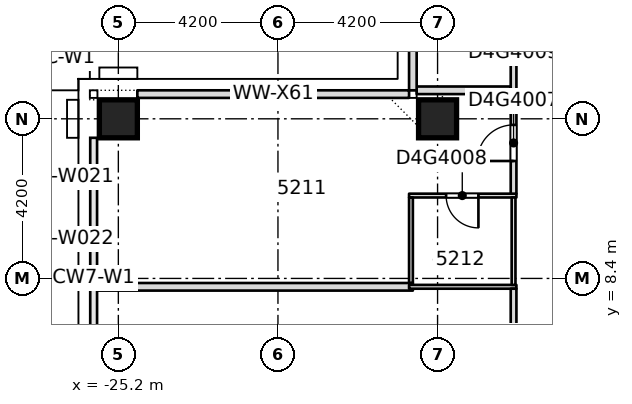
"""IFC4 building model, lengths in metres.
Left out: names, types, materials, properties, quantities, classifications, styles, units other than length and angle.
Written with IfcOpenShell. Run it as: python <this file> out.ifc"""

import sys

from ifc_helpers import new_model, si_unit, direction, frame, frame_2d, origin, origin_2d, place, context, subcontext, project, spatial, rectangle, extrude, element, fill, save


model = new_model("IFC4")
c1 = context("Model", 3, precision=1e-05, world=origin(), true_north=direction((0.0, 1.0)))
c2 = subcontext(c1, "Body", "Model", "MODEL_VIEW")
j1 = project(units=[si_unit("LENGTHUNIT", "METRE"), si_unit("PLANEANGLEUNIT", "RADIAN")], contexts=[c1])
p1 = place(None, origin())
s1 = spatial("IfcSite", under=j1, at=p1, CompositionType="ELEMENT")
p2 = place(p1, origin())
s2 = spatial("IfcBuilding", under=s1, at=p2, CompositionType="ELEMENT")
p3 = place(p2, frame((0.0, 0.0, 199.7)))
s3 = spatial("IfcBuildingStorey", under=s2, at=p3, CompositionType="ELEMENT", Elevation=199.7)
for number, where, z_axis, x_axis in (
    (1, (-25.2, 12.6, -0.4), (0.0, 0.0, 1.0), (1.0, 0.0, 0.0)),
    (2, (-16.8, 12.6, -0.4), (0.0, 0.0, 1.0), (1.0, 0.0, 0.0)),
):
    element("IfcColumn", number, at=place(p3, frame(where, z_axis=z_axis, x_axis=x_axis)), inside=s3, PredefinedType="COLUMN", context=c2, shape_type="SweptSolid", body=[
        extrude(rectangle(XDim=1.0, YDim=1.0, at=origin_2d()), origin(), (0.0, 0.0, 1.0), 3.45),
    ])
p4 = place(p3, frame((-25.75, 8.18, 0.0), z_axis=(0.0, 0.0, 1.0), x_axis=(1.0, 0.0, 0.0)))
e3 = element("IfcWall", 3, at=p4, inside=s3, PredefinedType="PARTITIONING", context=c2, shape_type="SweptSolid", body=[
    extrude(rectangle(XDim=8.3, YDim=0.2, at=frame_2d((4.15, 0.0))), origin(), (0.0, 0.0, 1.0), 3.05),
])
p5 = place(p3, frame((-17.55, 8.18, 0.0), z_axis=(0.0, 0.0, 1.0), x_axis=(1.0, 0.0, 0.0)))
e4 = element("IfcWall", 4, at=p5, inside=s3, PredefinedType="PARTITIONING", context=c2, shape_type="SweptSolid", body=[
    extrude(rectangle(XDim=2.825, YDim=0.1, at=frame_2d((1.413, 0.0))), origin(), (0.0, 0.0, 1.0), 3.05),
])
p6 = place(p3, frame((-17.55, 10.58, 0.0), z_axis=(0.0, 0.0, 1.0), x_axis=(1.0, 0.0, 0.0)))
e5 = element("IfcWall", 5, at=p6, inside=s3, PredefinedType="PARTITIONING", context=c2, shape_type="SweptSolid", body=[
    extrude(rectangle(XDim=2.825, YDim=0.1, at=frame_2d((1.413, 0.0))), origin(), (0.0, 0.0, 1.0), 3.05),
])
p7 = place(p6, frame((0.975, 0.0, 0.0)))
e6 = element("IfcOpeningElement", 6, at=p7, cuts=e5, PredefinedType="OPENING", context=c2, shape_type="SweptSolid", body=[
    extrude(rectangle(XDim=0.85, YDim=2.1, at=frame_2d((0.425, 1.05))), frame((0.0, 0.06, 0.0), z_axis=(0.0, -1.0, 0.0), x_axis=(1.0, 0.0, 0.0)), (0.0, 0.0, 1.0), 0.12),
])
p8 = place(p3, frame((-17.35, 13.35, 0.0), z_axis=(0.0, 0.0, 1.0), x_axis=(1.0, 0.0, 0.0)))
e7 = element("IfcWall", 7, at=p8, inside=s3, PredefinedType="PARTITIONING", context=c2, shape_type="SweptSolid", body=[
    extrude(rectangle(XDim=2.475, YDim=0.2, at=frame_2d((1.238, 0.0))), origin(), (0.0, 0.0, 1.0), 3.05),
])
p9 = place(p3, frame((-17.5, 8.28, 0.0), z_axis=(0.0, 0.0, 1.0), x_axis=(0.0, 1.0, 0.0)))
e8 = element("IfcWall", 8, at=p9, inside=s3, PredefinedType="PARTITIONING", context=c2, shape_type="SweptSolid", body=[
    extrude(rectangle(XDim=2.25, YDim=0.1, at=frame_2d((1.125, 0.0))), origin(), (0.0, 0.0, 1.0), 3.05),
])
p10 = place(p3, frame((-14.8, -10.45, 0.0), z_axis=(0.0, 0.0, 1.0), x_axis=(0.0, 1.0, 0.0)))
e9 = element("IfcWall", 9, at=p10, inside=s3, PredefinedType="PARTITIONING", context=c2, shape_type="SweptSolid", body=[
    extrude(rectangle(XDim=18.58, YDim=0.15, at=frame_2d((9.29, 0.0))), origin(), (0.0, 0.0, 1.0), 3.05),
])
p11 = place(p10, frame((0.9, 0.0, 0.0)))
e10 = element("IfcOpeningElement", 10, at=p11, cuts=e9, PredefinedType="OPENING", context=c2, shape_type="SweptSolid", body=[
    extrude(rectangle(XDim=0.95, YDim=2.1, at=frame_2d((0.475, 1.05))), frame((0.0, 0.085, 0.0), z_axis=(0.0, -1.0, 0.0), x_axis=(1.0, 0.0, 0.0)), (0.0, 0.0, 1.0), 0.17),
])
p12 = place(p10, frame((15.74, 0.0, 0.0)))
e11 = element("IfcOpeningElement", 11, at=p12, cuts=e9, PredefinedType="OPENING", context=c2, shape_type="SweptSolid", body=[
    extrude(rectangle(XDim=1.0, YDim=2.1, at=frame_2d((0.5, 1.05))), frame((0.0, 0.085, 0.0), z_axis=(0.0, -1.0, 0.0), x_axis=(1.0, 0.0, 0.0)), (0.0, 0.0, 1.0), 0.17),
])
p13 = place(p10, frame((9.9, 0.0, 0.0)))
e12 = element("IfcOpeningElement", 12, at=p13, cuts=e9, PredefinedType="OPENING", context=c2, shape_type="SweptSolid", body=[
    extrude(rectangle(XDim=1.1, YDim=2.1, at=frame_2d((0.55, 1.05))), frame((0.0, 0.085, 0.0), z_axis=(0.0, -1.0, 0.0), x_axis=(1.0, 0.0, 0.0)), (0.0, 0.0, 1.0), 0.17),
])
p14 = place(p10, frame((4.75, 0.0, 0.0)))
e13 = element("IfcOpeningElement", 13, at=p14, cuts=e9, PredefinedType="OPENING", context=c2, shape_type="SweptSolid", body=[
    extrude(rectangle(XDim=1.0, YDim=2.1, at=frame_2d((0.5, 1.05))), frame((0.0, 0.085, 0.0), z_axis=(0.0, -1.0, 0.0), x_axis=(1.0, 0.0, 0.0)), (0.0, 0.0, 1.0), 0.17),
])
p15 = place(p3, frame((-14.8, 8.23, 0.0), z_axis=(0.0, 0.0, 1.0), x_axis=(0.0, 1.0, 0.0)))
e14 = element("IfcWall", 14, at=p15, inside=s3, PredefinedType="PARTITIONING", context=c2, shape_type="SweptSolid", body=[
    extrude(rectangle(XDim=2.3, YDim=0.1, at=frame_2d((1.15, 0.0))), origin(), (0.0, 0.0, 1.0), 3.05),
])
p16 = place(p3, frame((-14.8, 10.63, 0.0), z_axis=(0.0, 0.0, 1.0), x_axis=(0.0, 1.0, 0.0)))
e15 = element("IfcWall", 15, at=p16, inside=s3, PredefinedType="PARTITIONING", context=c2, shape_type="SweptSolid", body=[
    extrude(rectangle(XDim=10.92, YDim=0.15, at=frame_2d((5.46, 0.0))), origin(), (0.0, 0.0, 1.0), 3.05),
])
p17 = place(p16, frame((0.86, 0.0, 0.0)))
e16 = element("IfcOpeningElement", 16, at=p17, cuts=e15, PredefinedType="OPENING", context=c2, shape_type="SweptSolid", body=[
    extrude(rectangle(XDim=0.95, YDim=2.1, at=frame_2d((0.475, 1.05))), frame((0.0, 0.085, 0.0), z_axis=(0.0, -1.0, 0.0), x_axis=(1.0, 0.0, 0.0)), (0.0, 0.0, 1.0), 0.17),
])
p18 = place(p16, frame((4.32, 0.0, 0.0)))
e17 = element("IfcOpeningElement", 17, at=p18, cuts=e15, PredefinedType="OPENING", context=c2, shape_type="SweptSolid", body=[
    extrude(rectangle(XDim=0.95, YDim=2.1, at=frame_2d((0.475, 1.05))), frame((0.0, 0.085, 0.0), z_axis=(0.0, -1.0, 0.0), x_axis=(1.0, 0.0, 0.0)), (0.0, 0.0, 1.0), 0.17),
])
p19 = place(p16, frame((8.22, 0.0, 0.0)))
e18 = element("IfcOpeningElement", 18, at=p19, cuts=e15, PredefinedType="OPENING", context=c2, shape_type="SweptSolid", body=[
    extrude(rectangle(XDim=0.95, YDim=2.1, at=frame_2d((0.475, 1.05))), frame((0.0, 0.085, 0.0), z_axis=(0.0, -1.0, 0.0), x_axis=(1.0, 0.0, 0.0)), (0.0, 0.0, 1.0), 0.17),
])
p20 = place(p3, frame((-17.45, 20.5, 0.0), z_axis=(0.0, 0.0, 1.0), x_axis=(0.0, -1.0, 0.0)))
e19 = element("IfcWall", 19, at=p20, inside=s3, PredefinedType="STANDARD", context=c2, shape_type="SweptSolid", body=[
    extrude(rectangle(XDim=7.15, YDim=0.2, at=frame_2d((3.575, 0.0))), origin(), (0.0, 0.0, 1.0), 3.05),
])
p21 = place(p20, frame((3.975, 0.0, 0.2)))
e20 = element("IfcOpeningElement", 20, at=p21, cuts=e19, PredefinedType="OPENING", context=c2, shape_type="SweptSolid", body=[
    extrude(rectangle(XDim=1.8, YDim=2.65, at=frame_2d((0.9, 1.325))), frame((0.0, 0.11, 0.0), z_axis=(0.0, -1.0, 0.0), x_axis=(1.0, 0.0, 0.0)), (0.0, 0.0, 1.0), 0.22),
])
p22 = place(p20, frame((0.4, 0.0, 0.2)))
e21 = element("IfcOpeningElement", 21, at=p22, cuts=e19, PredefinedType="OPENING", context=c2, shape_type="SweptSolid", body=[
    extrude(rectangle(XDim=1.8, YDim=2.65, at=frame_2d((0.9, 1.325))), frame((0.0, 0.11, 0.0), z_axis=(0.0, -1.0, 0.0), x_axis=(1.0, 0.0, 0.0)), (0.0, 0.0, 1.0), 0.22),
])
p23 = place(p3, frame((-17.55, 13.25, 0.0), z_axis=(0.0, 0.0, 1.0), x_axis=(-1.0, 0.0, 0.0)))
e22 = element("IfcWall", 22, at=p23, inside=s3, PredefinedType="STANDARD", context=c2, shape_type="SweptSolid", body=[
    extrude(rectangle(XDim=7.15, YDim=0.2, at=frame_2d((3.575, 0.0))), origin(), (0.0, 0.0, 1.0), 3.05),
])
p24 = place(p17, origin())
e23 = element("IfcDoor", 23, at=p24, inside=s3, OperationType="SINGLE_SWING_LEFT", PredefinedType="DOOR", context=c2, shape_type="SweptSolid", body=[
    extrude(rectangle(XDim=0.95, YDim=2.1, at=frame_2d((0.475, 1.05))), frame((0.0, 0.025, 0.0), z_axis=(0.0, -1.0, 0.0), x_axis=(1.0, 0.0, 0.0)), (0.0, 0.0, 1.0), 0.05),
])
fill(e16, e23)
p25 = place(p7, origin())
e24 = element("IfcDoor", 24, at=p25, inside=s3, OperationType="SINGLE_SWING_RIGHT", PredefinedType="DOOR", context=c2, shape_type="SweptSolid", body=[
    extrude(rectangle(XDim=0.85, YDim=2.1, at=frame_2d((0.425, 1.05))), frame((0.0, 0.025, 0.0), z_axis=(0.0, -1.0, 0.0), x_axis=(1.0, 0.0, 0.0)), (0.0, 0.0, 1.0), 0.05),
])
fill(e6, e24)
save(model, sys.argv[1])
